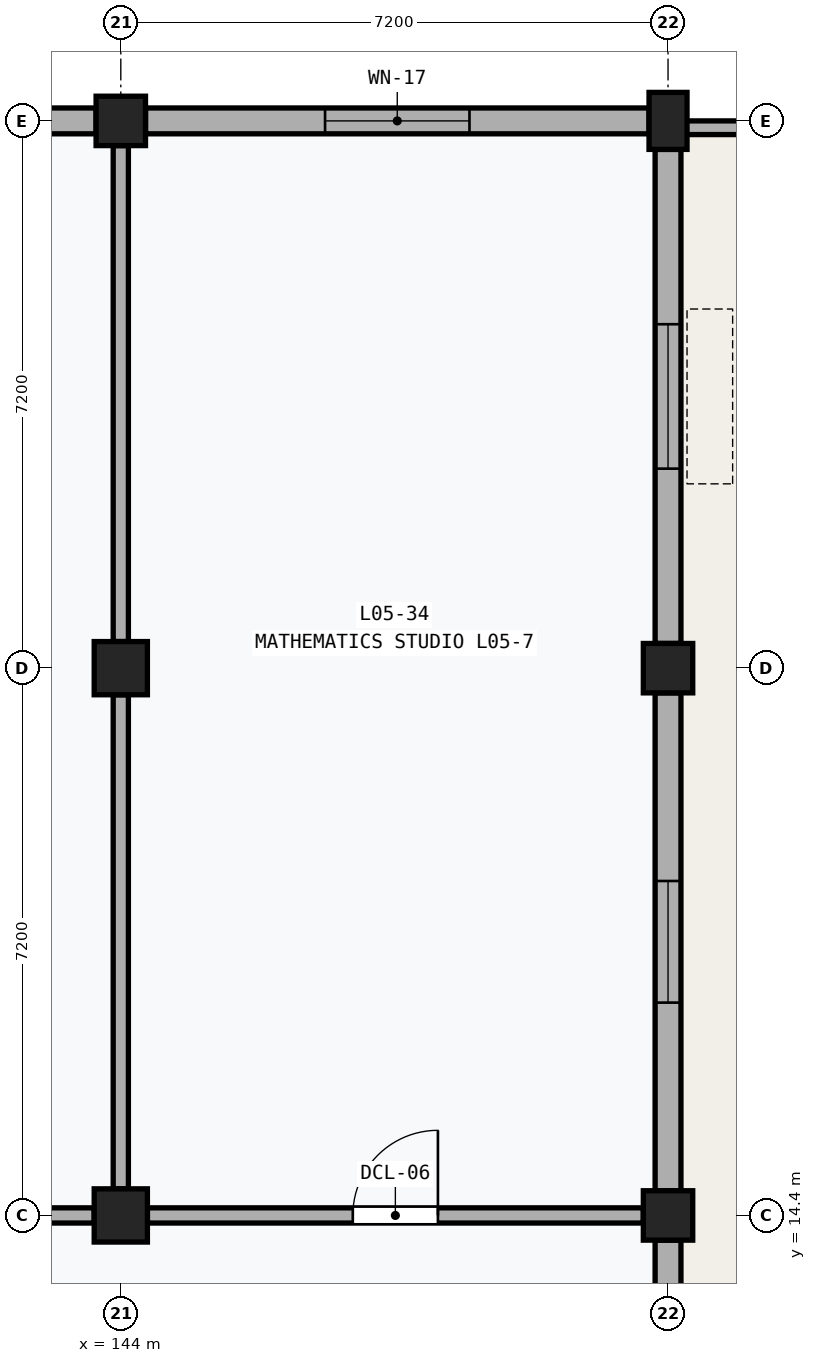
"""IFC4 building model, lengths in metres.
Left out: names, types, materials, properties, quantities, classifications, styles, units other than length and angle.
Written with IfcOpenShell. Run it as: python <this file> out.ifc"""

import sys

from ifc_helpers import new_model, si_unit, direction, frame, frame_2d, origin, origin_2d, place, context, subcontext, project, spatial, rectangle, extrude, element, fill, save


model = new_model("IFC4")
c1 = context("Model", 3, precision=1e-05, world=origin(), true_north=direction((0.0, 1.0)))
c2 = subcontext(c1, "Body", "Model", "MODEL_VIEW")
j1 = project(units=[si_unit("LENGTHUNIT", "METRE"), si_unit("PLANEANGLEUNIT", "RADIAN")], contexts=[c1])
p1 = place(None, origin())
s1 = spatial("IfcSite", under=j1, at=p1, CompositionType="ELEMENT")
p2 = place(p1, origin())
s2 = spatial("IfcBuilding", under=s1, at=p2, CompositionType="ELEMENT")
p3 = place(p2, frame((0.0, 0.0, 22.6)))
s3 = spatial("IfcBuildingStorey", under=s2, at=p3, CompositionType="ELEMENT", Elevation=22.6)
for number, where, z_axis, x_axis in (
    (1, (144.0, 14.4, 0.0), (0.0, 0.0, 1.0), (1.0, 0.0, 0.0)),
    (2, (144.0, 21.6, 0.0), (0.0, 0.0, 1.0), (1.0, 0.0, 0.0)),
):
    element("IfcColumn", number, at=place(p3, frame(where, z_axis=z_axis, x_axis=x_axis)), inside=s3, PredefinedType="COLUMN", context=c2, shape_type="SweptSolid", body=[
        extrude(rectangle(XDim=0.7, YDim=0.7, at=origin_2d()), origin(), (0.0, 0.0, 1.0), 4.0),
    ])
for number, where, z_axis, x_axis in (
    (3, (144.0, 28.8, 0.0), (0.0, 0.0, 1.0), (1.0, 0.0, 0.0)),
    (4, (151.2, 14.4, 0.0), (0.0, 0.0, 1.0), (1.0, 0.0, 0.0)),
    (5, (151.2, 21.6, 0.0), (0.0, 0.0, 1.0), (1.0, 0.0, 0.0)),
):
    element("IfcColumn", number, at=place(p3, frame(where, z_axis=z_axis, x_axis=x_axis)), inside=s3, PredefinedType="COLUMN", context=c2, shape_type="SweptSolid", body=[
        extrude(rectangle(XDim=0.65, YDim=0.65, at=origin_2d()), origin(), (0.0, 0.0, 1.0), 4.0),
    ])
p4 = place(p3, frame((151.2, 28.8, 0.0), z_axis=(0.0, 0.0, 1.0), x_axis=(1.0, 0.0, 0.0)))
e6 = element("IfcColumn", 6, at=p4, inside=s3, PredefinedType="PILASTER", context=c2, shape_type="SweptSolid", body=[
    extrude(rectangle(XDim=0.5, YDim=0.75, at=origin_2d()), origin(), (0.0, 0.0, 1.0), 4.0),
])
p5 = place(p3, frame((137.125, 28.8, 0.0), z_axis=(0.0, 0.0, 1.0), x_axis=(1.0, 0.0, 0.0)))
e7 = element("IfcWall", 7, at=p5, inside=s3, PredefinedType="SOLIDWALL", context=c2, shape_type="SweptSolid", body=[
    extrude(rectangle(XDim=6.55, YDim=0.34, at=frame_2d((3.275, 0.0))), origin(), (0.0, 0.0, 1.0), 3.12),
])
p6 = place(p5, frame((2.475, 0.0, 1.1)))
e8 = element("IfcOpeningElement", 8, at=p6, cuts=e7, PredefinedType="OPENING", context=c2, shape_type="SweptSolid", body=[
    extrude(rectangle(XDim=1.6, YDim=1.5, at=frame_2d((0.8, 0.75))), frame((0.0, 0.182, 0.0), z_axis=(0.0, -1.0, 0.0), x_axis=(1.0, 0.0, 0.0)), (0.0, 0.0, 1.0), 0.364),
])
p7 = place(p3, frame((151.2, 7.525, 0.0), z_axis=(0.0, 0.0, 1.0), x_axis=(0.0, 1.0, 0.0)))
e9 = element("IfcWall", 9, at=p7, inside=s3, PredefinedType="SOLIDWALL", context=c2, shape_type="SweptSolid", body=[
    extrude(rectangle(XDim=6.55, YDim=0.34, at=frame_2d((3.275, 0.0))), origin(), (0.0, 0.0, 1.0), 3.12),
])
p8 = place(p7, frame((2.525, 0.0, 1.1)))
e10 = element("IfcOpeningElement", 10, at=p8, cuts=e9, PredefinedType="OPENING", context=c2, shape_type="SweptSolid", body=[
    extrude(rectangle(XDim=1.5, YDim=1.35, at=frame_2d((0.75, 0.675))), frame((0.0, 0.182, 0.0), z_axis=(0.0, -1.0, 0.0), x_axis=(1.0, 0.0, 0.0)), (0.0, 0.0, 1.0), 0.364),
])
p9 = place(p3, frame((151.2, 14.725, 0.0), z_axis=(0.0, 0.0, 1.0), x_axis=(0.0, 1.0, 0.0)))
e11 = element("IfcWall", 11, at=p9, inside=s3, PredefinedType="SOLIDWALL", context=c2, shape_type="SweptSolid", body=[
    extrude(rectangle(XDim=6.55, YDim=0.34, at=frame_2d((3.275, 0.0))), origin(), (0.0, 0.0, 1.0), 3.12),
])
p10 = place(p9, frame((2.475, 0.0, 1.1)))
e12 = element("IfcOpeningElement", 12, at=p10, cuts=e11, PredefinedType="OPENING", context=c2, shape_type="SweptSolid", body=[
    extrude(rectangle(XDim=1.6, YDim=1.5, at=frame_2d((0.8, 0.75))), frame((0.0, 0.182, 0.0), z_axis=(0.0, -1.0, 0.0), x_axis=(1.0, 0.0, 0.0)), (0.0, 0.0, 1.0), 0.364),
])
p11 = place(p3, frame((144.325, 28.8, 0.0), z_axis=(0.0, 0.0, 1.0), x_axis=(1.0, 0.0, 0.0)))
e13 = element("IfcWall", 13, at=p11, inside=s3, PredefinedType="SOLIDWALL", context=c2, shape_type="SweptSolid", body=[
    extrude(rectangle(XDim=6.625, YDim=0.34, at=frame_2d((3.312, 0.0))), origin(), (0.0, 0.0, 1.0), 3.12),
])
p12 = place(p11, frame((2.363, 0.0, 1.1)))
e14 = element("IfcOpeningElement", 14, at=p12, cuts=e13, PredefinedType="OPENING", context=c2, shape_type="SweptSolid", body=[
    extrude(rectangle(XDim=1.9, YDim=1.5, at=frame_2d((0.95, 0.75))), frame((0.0, 0.182, 0.0), z_axis=(0.0, -1.0, 0.0), x_axis=(1.0, 0.0, 0.0)), (0.0, 0.0, 1.0), 0.364),
])
p13 = place(p3, frame((151.2, 21.925, 0.0), z_axis=(0.0, 0.0, 1.0), x_axis=(0.0, 1.0, 0.0)))
e15 = element("IfcWall", 15, at=p13, inside=s3, PredefinedType="SOLIDWALL", context=c2, shape_type="SweptSolid", body=[
    extrude(rectangle(XDim=6.5, YDim=0.34, at=frame_2d((3.25, 0.0))), origin(), (0.0, 0.0, 1.0), 3.12),
])
p14 = place(p13, frame((2.3, 0.0, 1.1)))
e16 = element("IfcOpeningElement", 16, at=p14, cuts=e15, PredefinedType="OPENING", context=c2, shape_type="SweptSolid", body=[
    extrude(rectangle(XDim=1.9, YDim=1.5, at=frame_2d((0.95, 0.75))), frame((0.0, 0.182, 0.0), z_axis=(0.0, -1.0, 0.0), x_axis=(1.0, 0.0, 0.0)), (0.0, 0.0, 1.0), 0.364),
])
p15 = place(p3, frame((151.29, 28.71, 0.0), z_axis=(0.0, 0.0, 1.0), x_axis=(1.0, 0.0, 0.0)))
e17 = element("IfcWall", 17, at=p15, inside=s3, PredefinedType="PARAPET", context=c2, shape_type="SweptSolid", body=[
    extrude(rectangle(XDim=7.02, YDim=0.18, at=frame_2d((3.51, 0.0))), origin(), (0.0, 0.0, 1.0), 0.95),
])
p16 = place(p3, frame((137.15, 14.4, 0.0), z_axis=(0.0, 0.0, 1.0), x_axis=(1.0, 0.0, 0.0)))
e18 = element("IfcWall", 18, at=p16, inside=s3, PredefinedType="PARTITIONING", context=c2, shape_type="SweptSolid", body=[
    extrude(rectangle(XDim=6.5, YDim=0.2, at=frame_2d((3.25, 0.0))), origin(), (0.0, 0.0, 1.0), 2.98),
])
p17 = place(p16, frame((2.71, 0.0, 0.0)))
e19 = element("IfcOpeningElement", 19, at=p17, cuts=e18, PredefinedType="OPENING", context=c2, shape_type="SweptSolid", body=[
    extrude(rectangle(XDim=1.08, YDim=2.18, at=frame_2d((0.54, 1.09))), frame((0.0, 0.112, 0.0), z_axis=(0.0, -1.0, 0.0), x_axis=(1.0, 0.0, 0.0)), (0.0, 0.0, 1.0), 0.224),
])
p18 = place(p3, frame((144.0, 14.75, 0.0), z_axis=(0.0, 0.0, 1.0), x_axis=(0.0, 1.0, 0.0)))
e20 = element("IfcWall", 20, at=p18, inside=s3, PredefinedType="PARTITIONING", context=c2, shape_type="SweptSolid", body=[
    extrude(rectangle(XDim=6.5, YDim=0.2, at=frame_2d((3.25, 0.0))), origin(), (0.0, 0.0, 1.0), 2.98),
])
p19 = place(p3, frame((144.0, 21.95, 0.0), z_axis=(0.0, 0.0, 1.0), x_axis=(0.0, 1.0, 0.0)))
e21 = element("IfcWall", 21, at=p19, inside=s3, PredefinedType="PARTITIONING", context=c2, shape_type="SweptSolid", body=[
    extrude(rectangle(XDim=6.525, YDim=0.2, at=frame_2d((3.263, 0.0))), origin(), (0.0, 0.0, 1.0), 2.98),
])
p20 = place(p3, frame((144.35, 14.4, 0.0), z_axis=(0.0, 0.0, 1.0), x_axis=(1.0, 0.0, 0.0)))
e22 = element("IfcWall", 22, at=p20, inside=s3, PredefinedType="PARTITIONING", context=c2, shape_type="SweptSolid", body=[
    extrude(rectangle(XDim=6.525, YDim=0.2, at=frame_2d((3.262, 0.0))), origin(), (0.0, 0.0, 1.0), 2.98),
])
p21 = place(p20, frame((2.702, 0.0, 0.0)))
e23 = element("IfcOpeningElement", 23, at=p21, cuts=e22, PredefinedType="OPENING", context=c2, shape_type="SweptSolid", body=[
    extrude(rectangle(XDim=1.12, YDim=2.2, at=frame_2d((0.56, 1.1))), frame((0.0, 0.112, 0.0), z_axis=(0.0, -1.0, 0.0), x_axis=(1.0, 0.0, 0.0)), (0.0, 0.0, 1.0), 0.224),
])
p22 = place(p10, origin())
e24 = element("IfcWindow", 24, at=p22, inside=s3, PartitioningType="SINGLE_PANEL", PredefinedType="WINDOW", context=c2, shape_type="SweptSolid", body=[
    extrude(rectangle(XDim=1.6, YDim=1.5, at=frame_2d((0.8, 0.75))), frame((0.0, 0.03, 0.0), z_axis=(0.0, -1.0, 0.0), x_axis=(1.0, 0.0, 0.0)), (0.0, 0.0, 1.0), 0.06),
])
fill(e12, e24)
p23 = place(p12, origin())
e25 = element("IfcWindow", 25, at=p23, inside=s3, PartitioningType="SINGLE_PANEL", PredefinedType="WINDOW", context=c2, shape_type="SweptSolid", body=[
    extrude(rectangle(XDim=1.9, YDim=1.5, at=frame_2d((0.95, 0.75))), frame((0.0, 0.03, 0.0), z_axis=(0.0, -1.0, 0.0), x_axis=(1.0, 0.0, 0.0)), (0.0, 0.0, 1.0), 0.06),
])
fill(e14, e25)
p24 = place(p14, origin())
e26 = element("IfcWindow", 26, at=p24, inside=s3, PartitioningType="SINGLE_PANEL", PredefinedType="WINDOW", context=c2, shape_type="SweptSolid", body=[
    extrude(rectangle(XDim=1.9, YDim=1.5, at=frame_2d((0.95, 0.75))), frame((0.0, 0.03, 0.0), z_axis=(0.0, -1.0, 0.0), x_axis=(1.0, 0.0, 0.0)), (0.0, 0.0, 1.0), 0.06),
])
fill(e16, e26)
p25 = place(p21, origin())
e27 = element("IfcDoor", 27, at=p25, inside=s3, OperationType="SINGLE_SWING_RIGHT", PredefinedType="DOOR", context=c2, shape_type="SweptSolid", body=[
    extrude(rectangle(XDim=1.12, YDim=2.2, at=frame_2d((0.56, 1.1))), frame((0.0, 0.025, 0.0), z_axis=(0.0, -1.0, 0.0), x_axis=(1.0, 0.0, 0.0)), (0.0, 0.0, 1.0), 0.05),
])
fill(e23, e27)
save(model, sys.argv[1])
